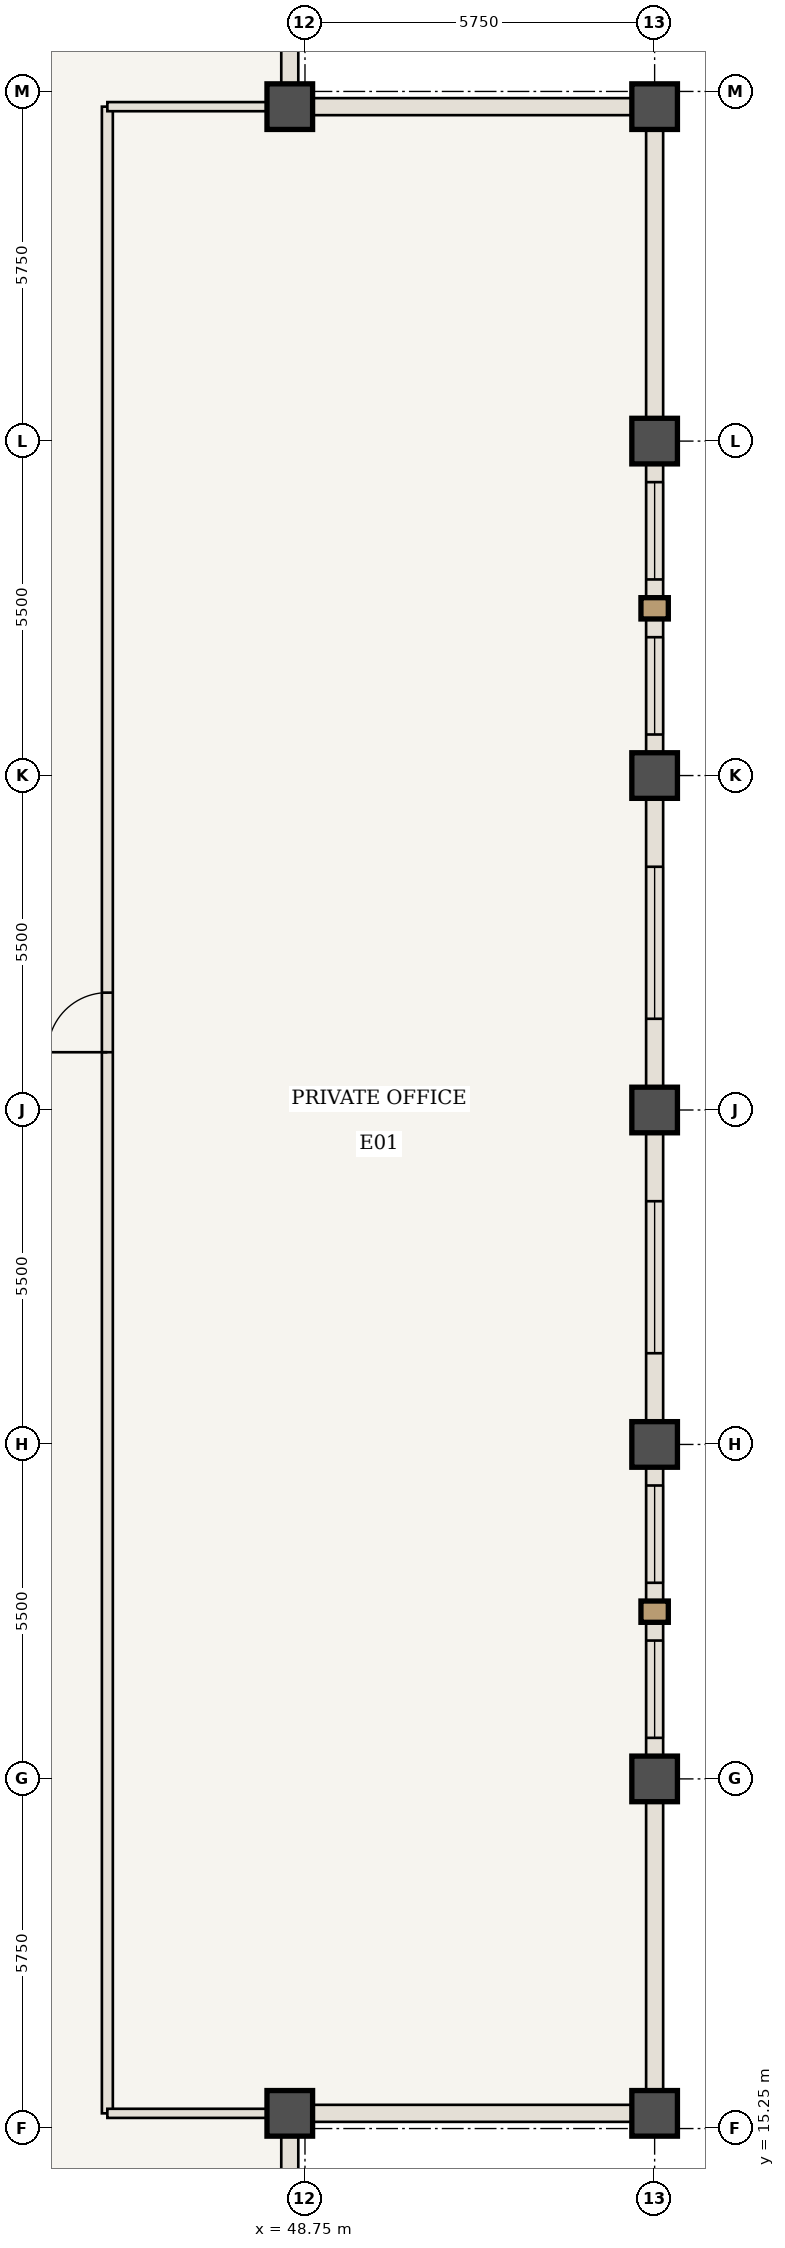
"""IFC4 building model, lengths in metres.
Left out: names, types, materials, properties, quantities, classifications, styles, units other than length and angle.
Written with IfcOpenShell. Run it as: python <this file> out.ifc"""

import sys

from ifc_helpers import new_model, si_unit, direction, frame, frame_2d, origin, origin_2d, place, context, subcontext, project, spatial, rectangle, extrude, element, fill, save


model = new_model("IFC4")
c1 = context("Model", 3, precision=1e-05, world=origin(), true_north=direction((0.0, 1.0)))
c2 = subcontext(c1, "Body", "Model", "MODEL_VIEW")
j1 = project(units=[si_unit("LENGTHUNIT", "METRE"), si_unit("PLANEANGLEUNIT", "RADIAN")], contexts=[c1])
p1 = place(None, origin())
s1 = spatial("IfcSite", under=j1, at=p1, CompositionType="ELEMENT")
p2 = place(p1, origin())
s2 = spatial("IfcBuilding", under=s1, at=p2, CompositionType="ELEMENT")
p3 = place(p2, frame((0.0, 0.0, 304.5)))
s3 = spatial("IfcBuildingStorey", under=s2, at=p3, CompositionType="ELEMENT", Elevation=304.5)
for number, where, z_axis, x_axis in (
    (1, (48.5, 15.5, 0.0), (0.0, 0.0, 1.0), (1.0, 0.0, 0.0)),
    (2, (54.5, 15.5, 0.0), (0.0, 0.0, 1.0), (1.0, 0.0, 0.0)),
    (3, (54.5, 48.5, 0.0), (0.0, 0.0, 1.0), (1.0, 0.0, 0.0)),
    (4, (48.5, 48.5, 0.0), (0.0, 0.0, 1.0), (1.0, 0.0, 0.0)),
    (5, (54.5, 21.0, 0.0), (0.0, 0.0, 1.0), (1.0, 0.0, 0.0)),
    (6, (54.5, 26.5, 0.0), (0.0, 0.0, 1.0), (1.0, 0.0, 0.0)),
    (7, (54.5, 32.0, 0.0), (0.0, 0.0, 1.0), (1.0, 0.0, 0.0)),
    (8, (54.5, 37.5, 0.0), (0.0, 0.0, 1.0), (1.0, 0.0, 0.0)),
    (9, (54.5, 43.0, 0.0), (0.0, 0.0, 1.0), (1.0, 0.0, 0.0)),
):
    element("IfcColumn", number, at=place(p3, frame(where, z_axis=z_axis, x_axis=x_axis)), inside=s3, PredefinedType="COLUMN", context=c2, shape_type="SweptSolid", body=[
        extrude(rectangle(XDim=0.75, YDim=0.75, at=origin_2d()), origin(), (0.0, 0.0, 1.0), 3.85),
    ])
p4 = place(p3, frame((45.5, 15.5, 0.0), z_axis=(0.0, 0.0, 1.0), x_axis=(0.0, 1.0, 0.0)))
e10 = element("IfcWall", 10, at=p4, inside=s3, PredefinedType="STANDARD", context=c2, shape_type="SweptSolid", body=[
    extrude(rectangle(XDim=33.0, YDim=0.18, at=frame_2d((16.5, 0.0))), origin(), (0.0, 0.0, 1.0), 3.63),
])
p5 = place(p4, frame((17.45, 0.0, 0.0)))
e11 = element("IfcOpeningElement", 11, at=p5, cuts=e10, PredefinedType="OPENING", context=c2, shape_type="SweptSolid", body=[
    extrude(rectangle(XDim=0.98, YDim=2.2, at=frame_2d((0.49, 1.1))), frame((0.0, 0.1, 0.0), z_axis=(0.0, -1.0, 0.0), x_axis=(1.0, 0.0, 0.0)), (0.0, 0.0, 1.0), 0.2),
])
for number, where, z_axis, x_axis in (
    (12, (45.5, 15.5, 0.0), (0.0, 0.0, 1.0), (1.0, 0.0, 0.0)),
    (13, (45.5, 48.5, 0.0), (0.0, 0.0, 1.0), (1.0, 0.0, 0.0)),
):
    element("IfcWall", number, at=place(p3, frame(where, z_axis=z_axis, x_axis=x_axis)), inside=s3, PredefinedType="STANDARD", context=c2, shape_type="SweptSolid", body=[
        extrude(rectangle(XDim=3.0, YDim=0.15, at=frame_2d((1.5, 0.0))), origin(), (0.0, 0.0, 1.0), 3.63),
    ])
p6 = place(p3, frame((54.5, 21.0, 0.0), z_axis=(0.0, 0.0, 1.0), x_axis=(0.0, -1.0, 0.0)))
e14 = element("IfcWall", 14, at=p6, inside=s3, PredefinedType="USERDEFINED", context=c2, shape_type="SweptSolid", body=[
    extrude(rectangle(XDim=5.5, YDim=0.28, at=frame_2d((2.75, 0.0))), origin(), (0.0, 0.0, 1.0), 2.93),
])
p7 = place(p3, frame((54.5, 26.5, 0.0), z_axis=(0.0, 0.0, 1.0), x_axis=(0.0, -1.0, 0.0)))
e15 = element("IfcWall", 15, at=p7, inside=s3, PredefinedType="USERDEFINED", context=c2, shape_type="SweptSolid", body=[
    extrude(rectangle(XDim=5.5, YDim=0.28, at=frame_2d((2.75, 0.0))), origin(), (0.0, 0.0, 1.0), 2.93),
])
p8 = place(p7, frame((0.675, 0.0, 0.85)))
e16 = element("IfcOpeningElement", 16, at=p8, cuts=e15, PredefinedType="OPENING", context=c2, shape_type="SweptSolid", body=[
    extrude(rectangle(XDim=1.6, YDim=1.88, at=frame_2d((0.8, 0.94))), frame((0.0, 0.15, 0.0), z_axis=(0.0, -1.0, 0.0), x_axis=(1.0, 0.0, 0.0)), (0.0, 0.0, 1.0), 0.3),
])
p9 = place(p7, frame((3.225, 0.0, 0.85)))
e17 = element("IfcOpeningElement", 17, at=p9, cuts=e15, PredefinedType="OPENING", context=c2, shape_type="SweptSolid", body=[
    extrude(rectangle(XDim=1.6, YDim=1.88, at=frame_2d((0.8, 0.94))), frame((0.0, 0.15, 0.0), z_axis=(0.0, -1.0, 0.0), x_axis=(1.0, 0.0, 0.0)), (0.0, 0.0, 1.0), 0.3),
])
p10 = place(p3, frame((54.5, 32.0, 0.0), z_axis=(0.0, 0.0, 1.0), x_axis=(0.0, -1.0, 0.0)))
e18 = element("IfcWall", 18, at=p10, inside=s3, PredefinedType="USERDEFINED", context=c2, shape_type="SweptSolid", body=[
    extrude(rectangle(XDim=5.5, YDim=0.28, at=frame_2d((2.75, 0.0))), origin(), (0.0, 0.0, 1.0), 2.93),
])
p11 = place(p10, frame((1.5, 0.0, 0.85)))
e19 = element("IfcOpeningElement", 19, at=p11, cuts=e18, PredefinedType="OPENING", context=c2, shape_type="SweptSolid", body=[
    extrude(rectangle(XDim=2.5, YDim=1.88, at=frame_2d((1.25, 0.94))), frame((0.0, 0.15, 0.0), z_axis=(0.0, -1.0, 0.0), x_axis=(1.0, 0.0, 0.0)), (0.0, 0.0, 1.0), 0.3),
])
p12 = place(p3, frame((54.5, 37.5, 0.0), z_axis=(0.0, 0.0, 1.0), x_axis=(0.0, -1.0, 0.0)))
e20 = element("IfcWall", 20, at=p12, inside=s3, PredefinedType="USERDEFINED", context=c2, shape_type="SweptSolid", body=[
    extrude(rectangle(XDim=5.5, YDim=0.28, at=frame_2d((2.75, 0.0))), origin(), (0.0, 0.0, 1.0), 2.93),
])
p13 = place(p12, frame((1.5, 0.0, 0.85)))
e21 = element("IfcOpeningElement", 21, at=p13, cuts=e20, PredefinedType="OPENING", context=c2, shape_type="SweptSolid", body=[
    extrude(rectangle(XDim=2.5, YDim=1.88, at=frame_2d((1.25, 0.94))), frame((0.0, 0.15, 0.0), z_axis=(0.0, -1.0, 0.0), x_axis=(1.0, 0.0, 0.0)), (0.0, 0.0, 1.0), 0.3),
])
p14 = place(p3, frame((54.5, 43.0, 0.0), z_axis=(0.0, 0.0, 1.0), x_axis=(0.0, -1.0, 0.0)))
e22 = element("IfcWall", 22, at=p14, inside=s3, PredefinedType="USERDEFINED", context=c2, shape_type="SweptSolid", body=[
    extrude(rectangle(XDim=5.5, YDim=0.28, at=frame_2d((2.75, 0.0))), origin(), (0.0, 0.0, 1.0), 2.93),
])
p15 = place(p14, frame((0.675, 0.0, 0.85)))
e23 = element("IfcOpeningElement", 23, at=p15, cuts=e22, PredefinedType="OPENING", context=c2, shape_type="SweptSolid", body=[
    extrude(rectangle(XDim=1.6, YDim=1.88, at=frame_2d((0.8, 0.94))), frame((0.0, 0.15, 0.0), z_axis=(0.0, -1.0, 0.0), x_axis=(1.0, 0.0, 0.0)), (0.0, 0.0, 1.0), 0.3),
])
p16 = place(p14, frame((3.225, 0.0, 0.85)))
e24 = element("IfcOpeningElement", 24, at=p16, cuts=e22, PredefinedType="OPENING", context=c2, shape_type="SweptSolid", body=[
    extrude(rectangle(XDim=1.6, YDim=1.88, at=frame_2d((0.8, 0.94))), frame((0.0, 0.15, 0.0), z_axis=(0.0, -1.0, 0.0), x_axis=(1.0, 0.0, 0.0)), (0.0, 0.0, 1.0), 0.3),
])
p17 = place(p3, frame((54.5, 48.5, 0.0), z_axis=(0.0, 0.0, 1.0), x_axis=(0.0, -1.0, 0.0)))
e25 = element("IfcWall", 25, at=p17, inside=s3, PredefinedType="USERDEFINED", context=c2, shape_type="SweptSolid", body=[
    extrude(rectangle(XDim=5.5, YDim=0.28, at=frame_2d((2.75, 0.0))), origin(), (0.0, 0.0, 1.0), 2.93),
])
for number, where, z_axis, x_axis in (
    (26, (48.5, 15.5, 0.0), (0.0, 0.0, 1.0), (0.0, -1.0, 0.0)),
    (27, (54.5, 15.5, 0.0), (0.0, 0.0, 1.0), (-1.0, 0.0, 0.0)),
    (28, (48.5, 48.5, 0.0), (0.0, 0.0, 1.0), (1.0, 0.0, 0.0)),
    (29, (48.5, 54.5, 0.0), (0.0, 0.0, 1.0), (0.0, -1.0, 0.0)),
):
    element("IfcWall", number, at=place(p3, frame(where, z_axis=z_axis, x_axis=x_axis)), inside=s3, PredefinedType="USERDEFINED", context=c2, shape_type="SweptSolid", body=[
        extrude(rectangle(XDim=6.0, YDim=0.28, at=frame_2d((3.0, 0.0))), origin(), (0.0, 0.0, 1.0), 2.93),
    ])
p18 = place(p5, origin())
e30 = element("IfcDoor", 30, at=p18, inside=s3, OperationType="SINGLE_SWING_LEFT", PredefinedType="DOOR", context=c2, shape_type="SweptSolid", body=[
    extrude(rectangle(XDim=0.98, YDim=2.2, at=frame_2d((0.49, 1.1))), frame((0.0, 0.025, 0.0), z_axis=(0.0, -1.0, 0.0), x_axis=(1.0, 0.0, 0.0)), (0.0, 0.0, 1.0), 0.05),
])
fill(e11, e30)
p19 = place(p8, origin())
e31 = element("IfcWindow", 31, at=p19, inside=s3, PartitioningType="SINGLE_PANEL", PredefinedType="WINDOW", context=c2, shape_type="SweptSolid", body=[
    extrude(rectangle(XDim=1.6, YDim=1.88, at=frame_2d((0.8, 0.94))), frame((0.0, 0.03, 0.0), z_axis=(0.0, -1.0, 0.0), x_axis=(1.0, 0.0, 0.0)), (0.0, 0.0, 1.0), 0.06),
])
fill(e16, e31)
p20 = place(p9, origin())
e32 = element("IfcWindow", 32, at=p20, inside=s3, PartitioningType="SINGLE_PANEL", PredefinedType="WINDOW", context=c2, shape_type="SweptSolid", body=[
    extrude(rectangle(XDim=1.6, YDim=1.88, at=frame_2d((0.8, 0.94))), frame((0.0, 0.03, 0.0), z_axis=(0.0, -1.0, 0.0), x_axis=(1.0, 0.0, 0.0)), (0.0, 0.0, 1.0), 0.06),
])
fill(e17, e32)
p21 = place(p11, origin())
e33 = element("IfcWindow", 33, at=p21, inside=s3, PartitioningType="SINGLE_PANEL", PredefinedType="WINDOW", context=c2, shape_type="SweptSolid", body=[
    extrude(rectangle(XDim=2.5, YDim=1.88, at=frame_2d((1.25, 0.94))), frame((0.0, 0.03, 0.0), z_axis=(0.0, -1.0, 0.0), x_axis=(1.0, 0.0, 0.0)), (0.0, 0.0, 1.0), 0.06),
])
fill(e19, e33)
p22 = place(p13, origin())
e34 = element("IfcWindow", 34, at=p22, inside=s3, PartitioningType="SINGLE_PANEL", PredefinedType="WINDOW", context=c2, shape_type="SweptSolid", body=[
    extrude(rectangle(XDim=2.5, YDim=1.88, at=frame_2d((1.25, 0.94))), frame((0.0, 0.03, 0.0), z_axis=(0.0, -1.0, 0.0), x_axis=(1.0, 0.0, 0.0)), (0.0, 0.0, 1.0), 0.06),
])
fill(e21, e34)
p23 = place(p15, origin())
e35 = element("IfcWindow", 35, at=p23, inside=s3, PartitioningType="SINGLE_PANEL", PredefinedType="WINDOW", context=c2, shape_type="SweptSolid", body=[
    extrude(rectangle(XDim=1.6, YDim=1.88, at=frame_2d((0.8, 0.94))), frame((0.0, 0.03, 0.0), z_axis=(0.0, -1.0, 0.0), x_axis=(1.0, 0.0, 0.0)), (0.0, 0.0, 1.0), 0.06),
])
fill(e23, e35)
p24 = place(p16, origin())
e36 = element("IfcWindow", 36, at=p24, inside=s3, PartitioningType="SINGLE_PANEL", PredefinedType="WINDOW", context=c2, shape_type="SweptSolid", body=[
    extrude(rectangle(XDim=1.6, YDim=1.88, at=frame_2d((0.8, 0.94))), frame((0.0, 0.03, 0.0), z_axis=(0.0, -1.0, 0.0), x_axis=(1.0, 0.0, 0.0)), (0.0, 0.0, 1.0), 0.06),
])
fill(e24, e36)
save(model, sys.argv[1])
